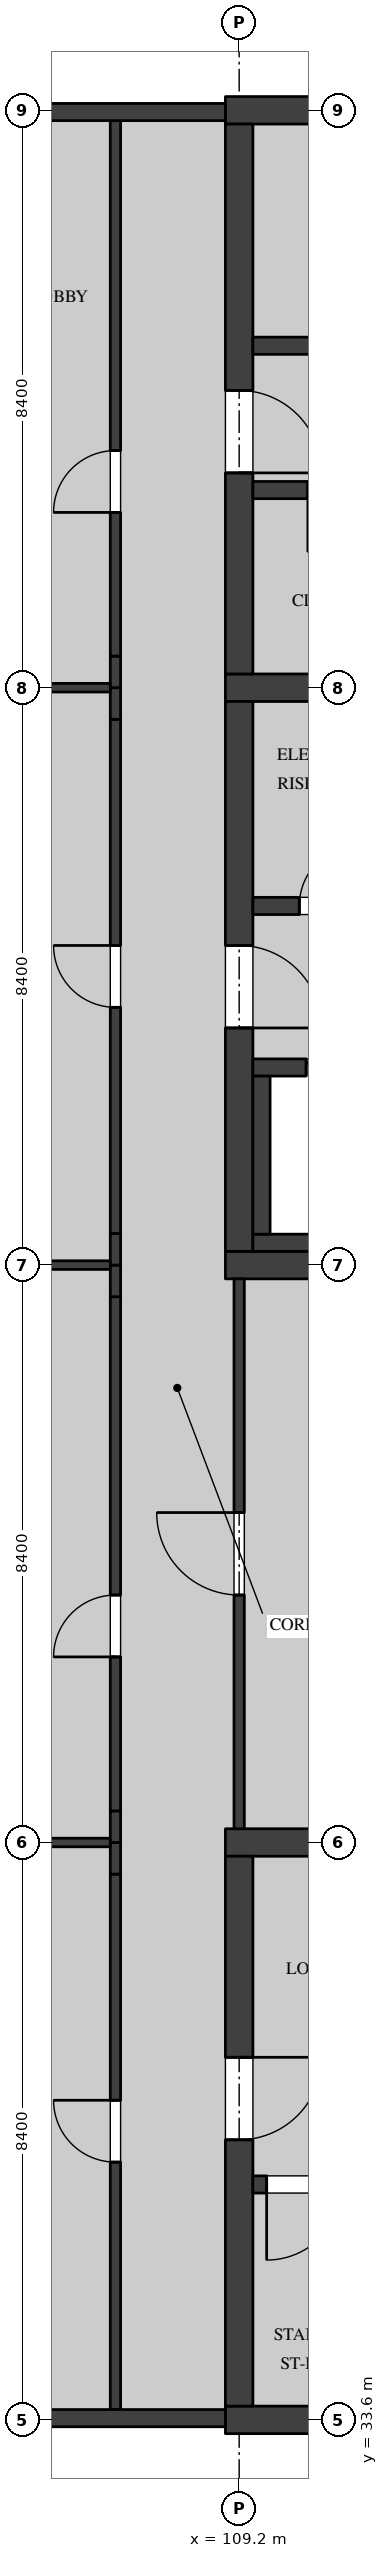
"""IFC4 building model, lengths in metres.
Left out: names, types, materials, properties, quantities, classifications, styles, units other than length and angle.
Written with IfcOpenShell. Run it as: python <this file> out.ifc"""

import sys

from ifc_helpers import new_model, si_unit, direction, frame, frame_2d, origin, place, context, subcontext, project, spatial, rectangle, extrude, element, fill, save


model = new_model("IFC4")
c1 = context("Model", 3, precision=1e-05, world=origin(), true_north=direction((0.0, 1.0)))
c2 = subcontext(c1, "Body", "Model", "MODEL_VIEW")
j1 = project(units=[si_unit("LENGTHUNIT", "METRE"), si_unit("PLANEANGLEUNIT", "RADIAN")], contexts=[c1])
p1 = place(None, origin())
s1 = spatial("IfcSite", under=j1, at=p1, CompositionType="ELEMENT")
p2 = place(p1, origin())
s2 = spatial("IfcBuilding", under=s1, at=p2, CompositionType="ELEMENT")
p3 = place(p2, frame((0.0, 0.0, 36.9)))
s3 = spatial("IfcBuildingStorey", under=s2, at=p3, CompositionType="ELEMENT", Elevation=36.9)
p4 = place(p3, frame((109.0, 50.4, 0.0), z_axis=(0.0, 0.0, 1.0), x_axis=(1.0, 0.0, 0.0)))
e1 = element("IfcWall", 1, at=p4, inside=s3, PredefinedType="SHEAR", context=c2, shape_type="SweptSolid", body=[
    extrude(rectangle(XDim=8.8, YDim=0.4, at=frame_2d((4.4, 0.0))), origin(), (0.0, 0.0, 1.0), 4.37),
])
p5 = place(p3, frame((109.0, 58.8, 0.0), z_axis=(0.0, 0.0, 1.0), x_axis=(1.0, 0.0, 0.0)))
e2 = element("IfcWall", 2, at=p5, inside=s3, PredefinedType="SHEAR", context=c2, shape_type="SweptSolid", body=[
    extrude(rectangle(XDim=8.8, YDim=0.4, at=frame_2d((4.4, 0.0))), origin(), (0.0, 0.0, 1.0), 4.37),
])
p6 = place(p5, frame((6.65, 0.0, 0.0)))
e3 = element("IfcOpeningElement", 3, at=p6, cuts=e2, PredefinedType="OPENING", context=c2, shape_type="SweptSolid", body=[
    extrude(rectangle(XDim=1.1, YDim=2.1, at=frame_2d((0.55, 1.05))), frame((0.0, 0.21, 0.0), z_axis=(0.0, -1.0, 0.0), x_axis=(1.0, 0.0, 0.0)), (0.0, 0.0, 1.0), 0.42),
])
p7 = place(p3, frame((109.2, 50.6, 0.0), z_axis=(0.0, 0.0, 1.0), x_axis=(0.0, 1.0, 0.0)))
e4 = element("IfcWall", 4, at=p7, inside=s3, PredefinedType="SHEAR", context=c2, shape_type="SweptSolid", body=[
    extrude(rectangle(XDim=8.0, YDim=0.4, at=frame_2d((4.0, 0.0))), origin(), (0.0, 0.0, 1.0), 4.37),
])
p8 = place(p7, frame((3.25, 0.0, 0.0)))
e5 = element("IfcOpeningElement", 5, at=p8, cuts=e4, PredefinedType="OPENING", context=c2, shape_type="SweptSolid", body=[
    extrude(rectangle(XDim=1.2, YDim=2.1, at=frame_2d((0.6, 1.05))), frame((0.0, 0.21, 0.0), z_axis=(0.0, -1.0, 0.0), x_axis=(1.0, 0.0, 0.0)), (0.0, 0.0, 1.0), 0.42),
])
p9 = place(p3, frame((109.4, 55.625, 0.0), z_axis=(0.0, 0.0, 1.0), x_axis=(1.0, 0.0, 0.0)))
e6 = element("IfcWall", 6, at=p9, inside=s3, PredefinedType="SOLIDWALL", context=c2, shape_type="SweptSolid", body=[
    extrude(rectangle(XDim=2.25, YDim=0.25, at=frame_2d((1.125, 0.0))), origin(), (0.0, 0.0, 1.0), 4.37),
])
p10 = place(p9, frame((0.675, 0.0, 0.0)))
e7 = element("IfcOpeningElement", 7, at=p10, cuts=e6, PredefinedType="OPENING", context=c2, shape_type="SweptSolid", body=[
    extrude(rectangle(XDim=0.9, YDim=2.1, at=frame_2d((0.45, 1.05))), frame((0.0, 0.135, 0.0), z_axis=(0.0, -1.0, 0.0), x_axis=(1.0, 0.0, 0.0)), (0.0, 0.0, 1.0), 0.27),
])
p11 = place(p3, frame((109.0, 67.2, 0.0), z_axis=(0.0, 0.0, 1.0), x_axis=(1.0, 0.0, 0.0)))
e8 = element("IfcWall", 8, at=p11, inside=s3, PredefinedType="SHEAR", context=c2, shape_type="SweptSolid", body=[
    extrude(rectangle(XDim=8.8, YDim=0.4, at=frame_2d((4.4, 0.0))), origin(), (0.0, 0.0, 1.0), 4.37),
])
p12 = place(p3, frame((109.2, 59.0, 0.0), z_axis=(0.0, 0.0, 1.0), x_axis=(0.0, 1.0, 0.0)))
e9 = element("IfcWall", 9, at=p12, inside=s3, PredefinedType="SHEAR", context=c2, shape_type="SweptSolid", body=[
    extrude(rectangle(XDim=8.0, YDim=0.4, at=frame_2d((4.0, 0.0))), origin(), (0.0, 0.0, 1.0), 4.37),
])
p13 = place(p12, frame((2.925, 0.0, 0.0)))
e10 = element("IfcOpeningElement", 10, at=p13, cuts=e9, PredefinedType="OPENING", context=c2, shape_type="SweptSolid", body=[
    extrude(rectangle(XDim=1.2, YDim=2.1, at=frame_2d((0.6, 1.05))), frame((0.0, 0.21, 0.0), z_axis=(0.0, -1.0, 0.0), x_axis=(1.0, 0.0, 0.0)), (0.0, 0.0, 1.0), 0.42),
])
p14 = place(p3, frame((117.4, 63.775, 0.0), z_axis=(0.0, 0.0, 1.0), x_axis=(-1.0, 0.0, 0.0)))
e11 = element("IfcWall", 11, at=p14, inside=s3, PredefinedType="SOLIDWALL", context=c2, shape_type="SweptSolid", body=[
    extrude(rectangle(XDim=8.0, YDim=0.25, at=frame_2d((4.0, 0.0))), origin(), (0.0, 0.0, 1.0), 4.37),
])
p15 = place(p14, frame((0.2, 0.0, 0.0)))
e12 = element("IfcOpeningElement", 12, at=p15, cuts=e11, PredefinedType="OPENING", context=c2, shape_type="SweptSolid", body=[
    extrude(rectangle(XDim=1.1, YDim=2.1, at=frame_2d((0.55, 1.05))), frame((0.0, 0.135, 0.0), z_axis=(0.0, -1.0, 0.0), x_axis=(1.0, 0.0, 0.0)), (0.0, 0.0, 1.0), 0.27),
])
p16 = place(p3, frame((114.75, 61.675, 0.0), z_axis=(0.0, 0.0, 1.0), x_axis=(-1.0, 0.0, 0.0)))
e13 = element("IfcWall", 13, at=p16, inside=s3, PredefinedType="SOLIDWALL", context=c2, shape_type="SweptSolid", body=[
    extrude(rectangle(XDim=5.35, YDim=0.25, at=frame_2d((2.675, 0.0))), origin(), (0.0, 0.0, 1.0), 4.37),
])
p17 = place(p16, frame((3.65, 0.0, 0.0)))
e14 = element("IfcOpeningElement", 14, at=p17, cuts=e13, PredefinedType="OPENING", context=c2, shape_type="SweptSolid", body=[
    extrude(rectangle(XDim=0.9, YDim=2.1, at=frame_2d((0.45, 1.05))), frame((0.0, 0.135, 0.0), z_axis=(0.0, -1.0, 0.0), x_axis=(1.0, 0.0, 0.0)), (0.0, 0.0, 1.0), 0.27),
])
p18 = place(p16, frame((0.9, 0.0, 0.0)))
e15 = element("IfcOpeningElement", 15, at=p18, cuts=e13, PredefinedType="OPENING", context=c2, shape_type="SweptSolid", body=[
    extrude(rectangle(XDim=0.8, YDim=2.1, at=frame_2d((0.4, 1.05))), frame((0.0, 0.135, 0.0), z_axis=(0.0, -1.0, 0.0), x_axis=(1.0, 0.0, 0.0)), (0.0, 0.0, 1.0), 0.27),
])
for number, where, z_axis, x_axis in (
    (16, (109.0, 33.6, 0.0), (0.0, 0.0, 1.0), (1.0, 0.0, 0.0)),
    (17, (109.0, 42.0, 0.0), (0.0, 0.0, 1.0), (1.0, 0.0, 0.0)),
):
    element("IfcWall", number, at=place(p3, frame(where, z_axis=z_axis, x_axis=x_axis)), inside=s3, PredefinedType="SHEAR", context=c2, shape_type="SweptSolid", body=[
        extrude(rectangle(XDim=8.8, YDim=0.4, at=frame_2d((4.4, 0.0))), origin(), (0.0, 0.0, 1.0), 4.37),
    ])
p19 = place(p3, frame((109.2, 33.8, 0.0), z_axis=(0.0, 0.0, 1.0), x_axis=(0.0, 1.0, 0.0)))
e18 = element("IfcWall", 18, at=p19, inside=s3, PredefinedType="SHEAR", context=c2, shape_type="SweptSolid", body=[
    extrude(rectangle(XDim=8.0, YDim=0.4, at=frame_2d((4.0, 0.0))), origin(), (0.0, 0.0, 1.0), 4.37),
])
p20 = place(p19, frame((3.875, 0.0, 0.0)))
e19 = element("IfcOpeningElement", 19, at=p20, cuts=e18, PredefinedType="OPENING", context=c2, shape_type="SweptSolid", body=[
    extrude(rectangle(XDim=1.2, YDim=2.1, at=frame_2d((0.6, 1.05))), frame((0.0, 0.21, 0.0), z_axis=(0.0, -1.0, 0.0), x_axis=(1.0, 0.0, 0.0)), (0.0, 0.0, 1.0), 0.42),
])
p21 = place(p3, frame((109.4, 37.025, 0.0), z_axis=(0.0, 0.0, 1.0), x_axis=(1.0, 0.0, 0.0)))
e20 = element("IfcWall", 20, at=p21, inside=s3, PredefinedType="SOLIDWALL", context=c2, shape_type="SweptSolid", body=[
    extrude(rectangle(XDim=8.0, YDim=0.25, at=frame_2d((4.0, 0.0))), origin(), (0.0, 0.0, 1.0), 4.37),
])
p22 = place(p21, frame((0.2, 0.0, 0.0)))
e21 = element("IfcOpeningElement", 21, at=p22, cuts=e20, PredefinedType="OPENING", context=c2, shape_type="SweptSolid", body=[
    extrude(rectangle(XDim=1.1, YDim=2.1, at=frame_2d((0.55, 1.05))), frame((0.0, 0.135, 0.0), z_axis=(0.0, -1.0, 0.0), x_axis=(1.0, 0.0, 0.0)), (0.0, 0.0, 1.0), 0.27),
])
p23 = place(p3, frame((109.4, 53.275, 0.0), z_axis=(0.0, 0.0, 1.0), x_axis=(1.0, 0.0, 0.0)))
e22 = element("IfcWall", 22, at=p23, inside=s3, PredefinedType="SOLIDWALL", context=c2, shape_type="SweptSolid", body=[
    extrude(rectangle(XDim=2.65, YDim=0.25, at=frame_2d((1.325, 0.0))), origin(), (0.0, 0.0, 1.0), 4.37),
])
p24 = place(p23, frame((0.775, 0.0, 0.0)))
e23 = element("IfcOpeningElement", 23, at=p24, cuts=e22, PredefinedType="OPENING", context=c2, shape_type="SweptSolid", body=[
    extrude(rectangle(XDim=1.1, YDim=2.1, at=frame_2d((0.55, 1.05))), frame((0.0, 0.135, 0.0), z_axis=(0.0, -1.0, 0.0), x_axis=(1.0, 0.0, 0.0)), (0.0, 0.0, 1.0), 0.27),
])
p25 = place(p3, frame((109.4, 50.725, 0.0), z_axis=(0.0, 0.0, 1.0), x_axis=(1.0, 0.0, 0.0)))
e24 = element("IfcWall", 24, at=p25, inside=s3, PredefinedType="SOLIDWALL", context=c2, shape_type="SweptSolid", body=[
    extrude(rectangle(XDim=2.65, YDim=0.25, at=frame_2d((1.325, 0.0))), origin(), (0.0, 0.0, 1.0), 4.37),
])
p26 = place(p3, frame((109.525, 50.85, 0.0), z_axis=(0.0, 0.0, 1.0), x_axis=(0.0, 1.0, 0.0)))
e25 = element("IfcWall", 25, at=p26, inside=s3, PredefinedType="SOLIDWALL", context=c2, shape_type="SweptSolid", body=[
    extrude(rectangle(XDim=2.3, YDim=0.25, at=frame_2d((1.15, 0.0))), origin(), (0.0, 0.0, 1.0), 4.37),
])
p27 = place(p3, frame((109.2, 42.2, 0.0), z_axis=(0.0, 0.0, 1.0), x_axis=(0.0, 1.0, 0.0)))
e26 = element("IfcWall", 26, at=p27, inside=s3, PredefinedType="PARTITIONING", context=c2, shape_type="SweptSolid", body=[
    extrude(rectangle(XDim=8.0, YDim=0.15, at=frame_2d((4.0, 0.0))), origin(), (0.0, 0.0, 1.0), 3.817),
])
p28 = place(p27, frame((3.4, 0.0, 0.0)))
e27 = element("IfcOpeningElement", 27, at=p28, cuts=e26, PredefinedType="OPENING", context=c2, shape_type="SweptSolid", body=[
    extrude(rectangle(XDim=1.2, YDim=2.4, at=frame_2d((0.6, 1.2))), frame((0.0, 0.085, 0.0), z_axis=(0.0, -1.0, 0.0), x_axis=(1.0, 0.0, 0.0)), (0.0, 0.0, 1.0), 0.17),
])
p29 = place(p3, frame((107.4, 33.75, 0.0), z_axis=(0.0, 0.0, 1.0), x_axis=(0.0, 1.0, 0.0)))
e28 = element("IfcWall", 28, at=p29, inside=s3, PredefinedType="PARTITIONING", context=c2, shape_type="SweptSolid", body=[
    extrude(rectangle(XDim=7.79, YDim=0.15, at=frame_2d((3.895, 0.0))), origin(), (0.0, 0.0, 1.0), 4.37),
])
p30 = place(p29, frame((3.6, 0.0, 0.0)))
e29 = element("IfcOpeningElement", 29, at=p30, cuts=e28, PredefinedType="OPENING", context=c2, shape_type="SweptSolid", body=[
    extrude(rectangle(XDim=0.9, YDim=2.1, at=frame_2d((0.45, 1.05))), frame((0.0, 0.085, 0.0), z_axis=(0.0, -1.0, 0.0), x_axis=(1.0, 0.0, 0.0)), (0.0, 0.0, 1.0), 0.17),
])
for number, where, z_axis, x_axis in (
    (30, (107.4, 41.54, 0.0), (0.0, 0.0, 1.0), (0.0, 1.0, 0.0)),
    (31, (107.4, 42.0, 0.0), (0.0, 0.0, 1.0), (0.0, 1.0, 0.0)),
):
    element("IfcWall", number, at=place(p3, frame(where, z_axis=z_axis, x_axis=x_axis)), inside=s3, PredefinedType="PARTITIONING", context=c2, shape_type="SweptSolid", body=[
        extrude(rectangle(XDim=0.46, YDim=0.15, at=frame_2d((0.23, 0.0))), origin(), (0.0, 0.0, 1.0), 3.817),
    ])
p31 = place(p3, frame((107.4, 42.46, 0.0), z_axis=(0.0, 0.0, 1.0), x_axis=(0.0, 1.0, 0.0)))
e32 = element("IfcWall", 32, at=p31, inside=s3, PredefinedType="PARTITIONING", context=c2, shape_type="SweptSolid", body=[
    extrude(rectangle(XDim=7.48, YDim=0.15, at=frame_2d((3.74, 0.0))), origin(), (0.0, 0.0, 1.0), 4.37),
])
p32 = place(p31, frame((2.24, 0.0, 0.0)))
e33 = element("IfcOpeningElement", 33, at=p32, cuts=e32, PredefinedType="OPENING", context=c2, shape_type="SweptSolid", body=[
    extrude(rectangle(XDim=0.9, YDim=2.1, at=frame_2d((0.45, 1.05))), frame((0.0, 0.085, 0.0), z_axis=(0.0, -1.0, 0.0), x_axis=(1.0, 0.0, 0.0)), (0.0, 0.0, 1.0), 0.17),
])
p33 = place(p3, frame((107.4, 49.94, 0.0), z_axis=(0.0, 0.0, 1.0), x_axis=(0.0, 1.0, 0.0)))
e34 = element("IfcWall", 34, at=p33, inside=s3, PredefinedType="PARTITIONING", context=c2, shape_type="SweptSolid", body=[
    extrude(rectangle(XDim=0.46, YDim=0.15, at=frame_2d((0.23, 0.0))), origin(), (0.0, 0.0, 1.0), 3.817),
])
p34 = place(p3, frame((107.4, 50.4, 0.0), z_axis=(0.0, 0.0, 1.0), x_axis=(0.0, 1.0, 0.0)))
e35 = element("IfcWall", 35, at=p34, inside=s3, PredefinedType="PARTITIONING", context=c2, shape_type="SweptSolid", body=[
    extrude(rectangle(XDim=0.46, YDim=0.15, at=frame_2d((0.23, 0.0))), origin(), (0.0, 0.0, 1.0), 3.817),
])
p35 = place(p3, frame((107.4, 50.86, 0.0), z_axis=(0.0, 0.0, 1.0), x_axis=(0.0, 1.0, 0.0)))
e36 = element("IfcWall", 36, at=p35, inside=s3, PredefinedType="PARTITIONING", context=c2, shape_type="SweptSolid", body=[
    extrude(rectangle(XDim=7.48, YDim=0.15, at=frame_2d((3.74, 0.0))), origin(), (0.0, 0.0, 1.0), 4.37),
])
p36 = place(p35, frame((3.29, 0.0, 0.0)))
e37 = element("IfcOpeningElement", 37, at=p36, cuts=e36, PredefinedType="OPENING", context=c2, shape_type="SweptSolid", body=[
    extrude(rectangle(XDim=0.9, YDim=2.1, at=frame_2d((0.45, 1.05))), frame((0.0, 0.085, 0.0), z_axis=(0.0, -1.0, 0.0), x_axis=(1.0, 0.0, 0.0)), (0.0, 0.0, 1.0), 0.17),
])
for number, where, z_axis, x_axis in (
    (38, (107.4, 58.34, 0.0), (0.0, 0.0, 1.0), (0.0, 1.0, 0.0)),
    (39, (107.4, 58.8, 0.0), (0.0, 0.0, 1.0), (0.0, 1.0, 0.0)),
):
    element("IfcWall", number, at=place(p3, frame(where, z_axis=z_axis, x_axis=x_axis)), inside=s3, PredefinedType="PARTITIONING", context=c2, shape_type="SweptSolid", body=[
        extrude(rectangle(XDim=0.46, YDim=0.15, at=frame_2d((0.23, 0.0))), origin(), (0.0, 0.0, 1.0), 3.817),
    ])
p37 = place(p3, frame((107.4, 59.26, 0.0), z_axis=(0.0, 0.0, 1.0), x_axis=(0.0, 1.0, 0.0)))
e40 = element("IfcWall", 40, at=p37, inside=s3, PredefinedType="PARTITIONING", context=c2, shape_type="SweptSolid", body=[
    extrude(rectangle(XDim=7.79, YDim=0.15, at=frame_2d((3.895, 0.0))), origin(), (0.0, 0.0, 1.0), 4.37),
])
p38 = place(p37, frame((2.09, 0.0, 0.0)))
e41 = element("IfcOpeningElement", 41, at=p38, cuts=e40, PredefinedType="OPENING", context=c2, shape_type="SweptSolid", body=[
    extrude(rectangle(XDim=0.9, YDim=2.1, at=frame_2d((0.45, 1.05))), frame((0.0, 0.085, 0.0), z_axis=(0.0, -1.0, 0.0), x_axis=(1.0, 0.0, 0.0)), (0.0, 0.0, 1.0), 0.17),
])
for number, where, z_axis, x_axis in (
    (42, (100.928, 42.0, 0.0), (0.0, 0.0, 1.0), (1.0, 0.0, 0.0)),
    (43, (100.928, 50.4, 0.0), (0.0, 0.0, 1.0), (1.0, 0.0, 0.0)),
):
    element("IfcWall", number, at=place(p3, frame(where, z_axis=z_axis, x_axis=x_axis)), inside=s3, PredefinedType="PARTITIONING", context=c2, shape_type="SweptSolid", body=[
        extrude(rectangle(XDim=6.397, YDim=0.125, at=frame_2d((3.198, 0.0))), origin(), (0.0, 0.0, 1.0), 3.817),
    ])
p39 = place(p3, frame((105.0, 58.8, 0.0), z_axis=(0.0, 0.0, 1.0), x_axis=(1.0, 0.0, 0.0)))
e44 = element("IfcWall", 44, at=p39, inside=s3, PredefinedType="PARTITIONING", context=c2, shape_type="SweptSolid", body=[
    extrude(rectangle(XDim=2.325, YDim=0.125, at=frame_2d((1.163, 0.0))), origin(), (0.0, 0.0, 1.0), 3.817),
])
p40 = place(p3, frame((109.0, 67.175, 0.0), z_axis=(0.0, 0.0, 1.0), x_axis=(-1.0, 0.0, 0.0)))
e45 = element("IfcWall", 45, at=p40, inside=s3, PredefinedType="SOLIDWALL", context=c2, shape_type="SweptSolid", body=[
    extrude(rectangle(XDim=8.195, YDim=0.25, at=frame_2d((4.097, 0.0))), origin(), (0.0, 0.0, 1.0), 3.819),
])
p41 = place(p40, frame((5.65, 0.0, 1.5)))
e46 = element("IfcOpeningElement", 46, at=p41, cuts=e45, PredefinedType="OPENING", context=c2, shape_type="SweptSolid", body=[
    extrude(rectangle(XDim=0.9, YDim=1.2, at=frame_2d((0.45, 0.6))), frame((0.0, 0.135, 0.0), z_axis=(0.0, -1.0, 0.0), x_axis=(1.0, 0.0, 0.0)), (0.0, 0.0, 1.0), 0.27),
])
p42 = place(p3, frame((100.805, 33.625, 0.0), z_axis=(0.0, 0.0, 1.0), x_axis=(1.0, 0.0, 0.0)))
e47 = element("IfcWall", 47, at=p42, inside=s3, PredefinedType="SOLIDWALL", context=c2, shape_type="SweptSolid", body=[
    extrude(rectangle(XDim=8.195, YDim=0.25, at=frame_2d((4.097, 0.0))), origin(), (0.0, 0.0, 1.0), 3.819),
])
p43 = place(p42, frame((0.895, 0.0, 0.6)))
e48 = element("IfcOpeningElement", 48, at=p43, cuts=e47, PredefinedType="OPENING", context=c2, shape_type="SweptSolid", body=[
    extrude(rectangle(XDim=2.4, YDim=2.4, at=frame_2d((1.2, 1.2))), frame((0.0, 0.135, 0.0), z_axis=(0.0, -1.0, 0.0), x_axis=(1.0, 0.0, 0.0)), (0.0, 0.0, 1.0), 0.27),
])
p44 = place(p8, frame((1.2, 0.0, 0.0), z_axis=(0.0, 0.0, 1.0), x_axis=(-1.0, 0.0, 0.0)))
e49 = element("IfcDoor", 49, at=p44, inside=s3, OperationType="SINGLE_SWING_LEFT", PredefinedType="DOOR", context=c2, shape_type="SweptSolid", body=[
    extrude(rectangle(XDim=1.2, YDim=2.1, at=frame_2d((0.6, 1.05))), frame((0.0, 0.035, 0.0), z_axis=(0.0, -1.0, 0.0), x_axis=(1.0, 0.0, 0.0)), (0.0, 0.0, 1.0), 0.07),
])
fill(e5, e49)
p45 = place(p10, origin())
e50 = element("IfcDoor", 50, at=p45, inside=s3, OperationType="SINGLE_SWING_LEFT", PredefinedType="DOOR", context=c2, shape_type="SweptSolid", body=[
    extrude(rectangle(XDim=0.9, YDim=2.1, at=frame_2d((0.45, 1.05))), frame((0.0, 0.05, 0.0), z_axis=(0.0, -1.0, 0.0), x_axis=(1.0, 0.0, 0.0)), (0.0, 0.0, 1.0), 0.1),
])
fill(e7, e50)
p46 = place(p13, frame((1.2, 0.0, 0.0), z_axis=(0.0, 0.0, 1.0), x_axis=(-1.0, 0.0, 0.0)))
e51 = element("IfcDoor", 51, at=p46, inside=s3, OperationType="SINGLE_SWING_LEFT", PredefinedType="DOOR", context=c2, shape_type="SweptSolid", body=[
    extrude(rectangle(XDim=1.2, YDim=2.1, at=frame_2d((0.6, 1.05))), frame((0.0, 0.035, 0.0), z_axis=(0.0, -1.0, 0.0), x_axis=(1.0, 0.0, 0.0)), (0.0, 0.0, 1.0), 0.07),
])
fill(e10, e51)
p47 = place(p20, frame((1.2, 0.0, 0.0), z_axis=(0.0, 0.0, 1.0), x_axis=(-1.0, 0.0, 0.0)))
e52 = element("IfcDoor", 52, at=p47, inside=s3, OperationType="SINGLE_SWING_RIGHT", PredefinedType="DOOR", context=c2, shape_type="SweptSolid", body=[
    extrude(rectangle(XDim=1.2, YDim=2.1, at=frame_2d((0.6, 1.05))), frame((0.0, 0.035, 0.0), z_axis=(0.0, -1.0, 0.0), x_axis=(1.0, 0.0, 0.0)), (0.0, 0.0, 1.0), 0.07),
])
fill(e19, e52)
p48 = place(p22, frame((1.1, 0.0, 0.0), z_axis=(0.0, 0.0, 1.0), x_axis=(-1.0, 0.0, 0.0)))
e53 = element("IfcDoor", 53, at=p48, inside=s3, OperationType="SINGLE_SWING_LEFT", PredefinedType="DOOR", context=c2, shape_type="SweptSolid", body=[
    extrude(rectangle(XDim=1.1, YDim=2.1, at=frame_2d((0.55, 1.05))), frame((0.0, 0.035, 0.0), z_axis=(0.0, -1.0, 0.0), x_axis=(1.0, 0.0, 0.0)), (0.0, 0.0, 1.0), 0.07),
])
fill(e21, e53)
p49 = place(p24, origin())
e54 = element("IfcDoor", 54, at=p49, inside=s3, OperationType="DOUBLE_DOOR_SLIDING", PredefinedType="DOOR", context=c2, shape_type="SweptSolid", body=[
    extrude(rectangle(XDim=1.1, YDim=2.1, at=frame_2d((0.55, 1.05))), frame((0.0, 0.04, 0.0), z_axis=(0.0, -1.0, 0.0), x_axis=(1.0, 0.0, 0.0)), (0.0, 0.0, 1.0), 0.08),
])
fill(e23, e54)
p50 = place(p28, origin())
e55 = element("IfcDoor", 55, at=p50, inside=s3, OperationType="SINGLE_SWING_LEFT", PredefinedType="DOOR", context=c2, shape_type="SweptSolid", body=[
    extrude(rectangle(XDim=1.2, YDim=2.4, at=frame_2d((0.6, 1.2))), frame((0.0, 0.025, 0.0), z_axis=(0.0, -1.0, 0.0), x_axis=(1.0, 0.0, 0.0)), (0.0, 0.0, 1.0), 0.05),
])
fill(e27, e55)
p51 = place(p30, origin())
e56 = element("IfcDoor", 56, at=p51, inside=s3, OperationType="SINGLE_SWING_LEFT", PredefinedType="DOOR", context=c2, shape_type="SweptSolid", body=[
    extrude(rectangle(XDim=0.9, YDim=2.1, at=frame_2d((0.45, 1.05))), frame((0.0, 0.025, 0.0), z_axis=(0.0, -1.0, 0.0), x_axis=(1.0, 0.0, 0.0)), (0.0, 0.0, 1.0), 0.05),
])
fill(e29, e56)
p52 = place(p32, origin())
e57 = element("IfcDoor", 57, at=p52, inside=s3, OperationType="SINGLE_SWING_RIGHT", PredefinedType="DOOR", context=c2, shape_type="SweptSolid", body=[
    extrude(rectangle(XDim=0.9, YDim=2.1, at=frame_2d((0.45, 1.05))), frame((0.0, 0.025, 0.0), z_axis=(0.0, -1.0, 0.0), x_axis=(1.0, 0.0, 0.0)), (0.0, 0.0, 1.0), 0.05),
])
fill(e33, e57)
p53 = place(p36, origin())
e58 = element("IfcDoor", 58, at=p53, inside=s3, OperationType="SINGLE_SWING_LEFT", PredefinedType="DOOR", context=c2, shape_type="SweptSolid", body=[
    extrude(rectangle(XDim=0.9, YDim=2.1, at=frame_2d((0.45, 1.05))), frame((0.0, 0.025, 0.0), z_axis=(0.0, -1.0, 0.0), x_axis=(1.0, 0.0, 0.0)), (0.0, 0.0, 1.0), 0.05),
])
fill(e37, e58)
p54 = place(p38, origin())
e59 = element("IfcDoor", 59, at=p54, inside=s3, OperationType="SINGLE_SWING_RIGHT", PredefinedType="DOOR", context=c2, shape_type="SweptSolid", body=[
    extrude(rectangle(XDim=0.9, YDim=2.1, at=frame_2d((0.45, 1.05))), frame((0.0, 0.025, 0.0), z_axis=(0.0, -1.0, 0.0), x_axis=(1.0, 0.0, 0.0)), (0.0, 0.0, 1.0), 0.05),
])
fill(e41, e59)
save(model, sys.argv[1])
